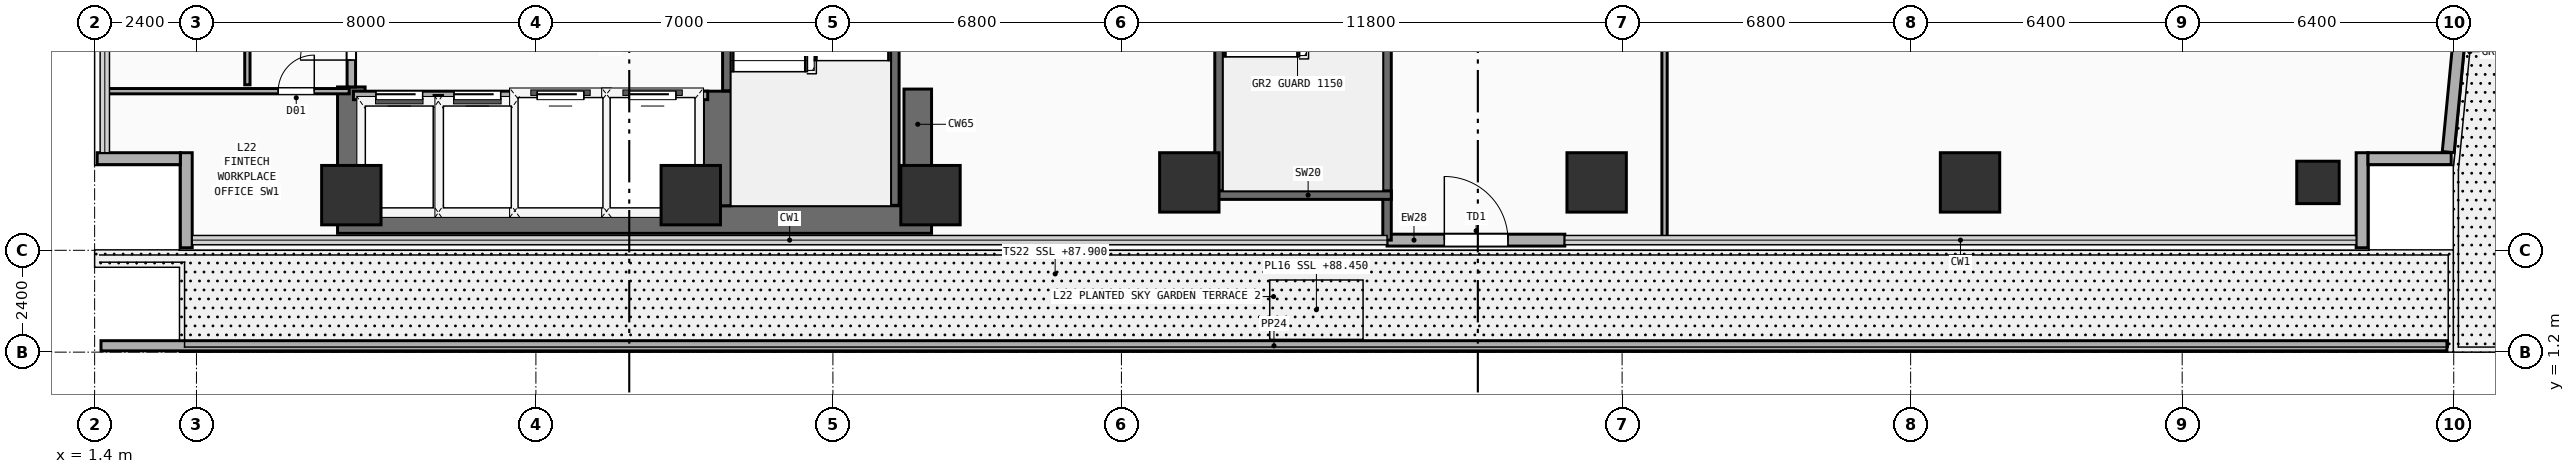
"""IFC4 building model, lengths in metres.
Left out: names, types, materials, properties, quantities, classifications, styles, units other than length and angle.
Written with IfcOpenShell. Run it as: python <this file> out.ifc"""

import sys

from ifc_helpers import new_model, si_unit, direction, frame, frame_2d, origin, origin_2d, place, context, subcontext, project, spatial, rectangle, extrude, element, fill, save


model = new_model("IFC4")
c1 = context("Model", 3, precision=1e-05, world=origin(), true_north=direction((0.0, 1.0)))
c2 = subcontext(c1, "Body", "Model", "MODEL_VIEW")
j1 = project(units=[si_unit("LENGTHUNIT", "METRE"), si_unit("PLANEANGLEUNIT", "RADIAN")], contexts=[c1])
p1 = place(None, origin())
s1 = spatial("IfcSite", under=j1, at=p1, CompositionType="ELEMENT")
p2 = place(p1, origin())
s2 = spatial("IfcBuilding", under=s1, at=p2, CompositionType="ELEMENT")
p3 = place(p2, frame((0.0, 0.0, 87.9)))
s3 = spatial("IfcBuildingStorey", under=s2, at=p3, CompositionType="ELEMENT", Elevation=87.9)
p4 = place(p3, frame((7.125, 4.325, 0.0), z_axis=(0.0, 0.0, 1.0), x_axis=(1.0, 0.0, 0.0)))
e1 = element("IfcWall", 1, at=p4, inside=s3, PredefinedType="SHEAR", context=c2, shape_type="SweptSolid", body=[
    extrude(rectangle(XDim=14.0, YDim=0.65, at=frame_2d((7.0, 0.0))), origin(), (0.0, 0.0, 1.0), 3.54),
])
p5 = place(p3, frame((7.45, 4.65, 0.0), z_axis=(0.0, 0.0, 1.0), x_axis=(0.0, 1.0, 0.0)))
e2 = element("IfcWall", 2, at=p5, inside=s3, PredefinedType="SHEAR", context=c2, shape_type="SweptSolid", body=[
    extrude(rectangle(XDim=2.8, YDim=0.65, at=frame_2d((1.4, 0.0))), origin(), (0.0, 0.0, 1.0), 3.54),
])
p6 = place(p3, frame((20.8, 4.65, 0.0), z_axis=(0.0, 0.0, 1.0), x_axis=(0.0, 1.0, 0.0)))
e3 = element("IfcWall", 3, at=p6, inside=s3, PredefinedType="SHEAR", context=c2, shape_type="SweptSolid", body=[
    extrude(rectangle(XDim=2.75, YDim=0.65, at=frame_2d((1.375, 0.0))), origin(), (0.0, 0.0, 1.0), 3.54),
])
p7 = place(p3, frame((16.075, 4.65, 0.0), z_axis=(0.0, 0.0, 1.0), x_axis=(0.0, 1.0, 0.0)))
e4 = element("IfcWall", 4, at=p7, inside=s3, PredefinedType="SHEAR", context=c2, shape_type="SweptSolid", body=[
    extrude(rectangle(XDim=2.7, YDim=0.65, at=frame_2d((1.35, 0.0))), origin(), (0.0, 0.0, 1.0), 3.54),
])
for number, where, z_axis, x_axis in (
    (5, (7.45, 4.9, 0.0), (0.0, 0.0, 1.0), (1.0, 0.0, 0.0)),
    (6, (15.45, 4.9, 0.0), (0.0, 0.0, 1.0), (1.0, 0.0, 0.0)),
    (7, (21.1, 4.9, 0.0), (0.0, 0.0, 1.0), (1.0, 0.0, 0.0)),
    (8, (27.2, 5.2, 0.0), (0.0, 0.0, 1.0), (1.0, 0.0, 0.0)),
    (9, (36.8, 5.2, 0.0), (0.0, 0.0, 1.0), (1.0, 0.0, 0.0)),
    (10, (45.6, 5.2, 0.0), (0.0, 0.0, 1.0), (1.0, 0.0, 0.0)),
):
    element("IfcColumn", number, at=place(p3, frame(where, z_axis=z_axis, x_axis=x_axis)), inside=s3, PredefinedType="COLUMN", context=c2, shape_type="SweptSolid", body=[
        extrude(rectangle(XDim=1.4, YDim=1.4, at=origin_2d()), origin(), (0.0, 0.0, 1.0), 3.54),
    ])
p8 = place(p3, frame((53.8, 5.2, 0.0), z_axis=(0.0, 0.0, 1.0), x_axis=(1.0, 0.0, 0.0)))
e11 = element("IfcColumn", 11, at=p8, inside=s3, PredefinedType="COLUMN", context=c2, shape_type="SweptSolid", body=[
    extrude(rectangle(XDim=1.0, YDim=1.0, at=origin_2d()), origin(), (0.0, 0.0, 1.0), 3.54),
])
p9 = place(p3, frame((31.86, 3.84, 0.0), z_axis=(0.0, 0.0, 1.0), x_axis=(1.0, 0.0, 0.0)))
e12 = element("IfcWall", 12, at=p9, inside=s3, PredefinedType="SOLIDWALL", context=c2, shape_type="SweptSolid", body=[
    extrude(rectangle(XDim=4.19, YDim=0.28, at=frame_2d((2.095, 0.0))), origin(), (0.0, 0.0, 1.0), 3.54),
])
p10 = place(p9, frame((1.35, 0.0, 0.0)))
e13 = element("IfcOpeningElement", 13, at=p10, cuts=e12, PredefinedType="OPENING", context=c2, shape_type="SweptSolid", body=[
    extrude(rectangle(XDim=1.5, YDim=2.25, at=frame_2d((0.75, 1.125))), frame((0.0, 0.15, 0.0), z_axis=(0.0, -1.0, 0.0), x_axis=(1.0, 0.0, 0.0)), (0.0, 0.0, 1.0), 0.3),
])
p11 = place(p3, frame((1.55, 1.35, 0.0), z_axis=(0.0, 0.0, 1.0), x_axis=(1.0, 0.0, 0.0)))
e14 = element("IfcWall", 14, at=p11, inside=s3, PredefinedType="PARAPET", context=c2, shape_type="SweptSolid", body=[
    extrude(rectangle(XDim=55.29, YDim=0.24, at=frame_2d((27.645, 0.0))), origin(), (0.0, 0.0, 1.0), 0.42),
])
p12 = place(p3, frame((3.56, 3.66, 0.0), z_axis=(0.0, 0.0, 1.0), x_axis=(0.0, 1.0, 0.0)))
e15 = element("IfcWall", 15, at=p12, inside=s3, PredefinedType="SOLIDWALL", context=c2, shape_type="SweptSolid", body=[
    extrude(rectangle(XDim=2.24, YDim=0.28, at=frame_2d((1.12, 0.0))), origin(), (0.0, 0.0, 1.0), 3.54),
])
p13 = place(p3, frame((1.46, 5.76, 0.0), z_axis=(0.0, 0.0, 1.0), x_axis=(1.0, 0.0, 0.0)))
e16 = element("IfcWall", 16, at=p13, inside=s3, PredefinedType="SOLIDWALL", context=c2, shape_type="SweptSolid", body=[
    extrude(rectangle(XDim=1.96, YDim=0.28, at=frame_2d((0.98, 0.0))), origin(), (0.0, 0.0, 1.0), 3.54),
])
p14 = place(p3, frame((54.84, 3.66, 0.0), z_axis=(0.0, 0.0, 1.0), x_axis=(0.0, 1.0, 0.0)))
e17 = element("IfcWall", 17, at=p14, inside=s3, PredefinedType="SOLIDWALL", context=c2, shape_type="SweptSolid", body=[
    extrude(rectangle(XDim=2.24, YDim=0.28, at=frame_2d((1.12, 0.0))), origin(), (0.0, 0.0, 1.0), 3.54),
])
p15 = place(p3, frame((54.98, 5.76, 0.0), z_axis=(0.0, 0.0, 1.0), x_axis=(1.0, 0.0, 0.0)))
e18 = element("IfcWall", 18, at=p15, inside=s3, PredefinedType="SOLIDWALL", context=c2, shape_type="SweptSolid", body=[
    extrude(rectangle(XDim=1.96, YDim=0.28, at=frame_2d((0.98, 0.0))), origin(), (0.0, 0.0, 1.0), 3.54),
])
p16 = place(p3, frame((56.869, 5.914, 0.0), z_axis=(0.0, 0.0, 1.0), x_axis=(0.095962807789, 0.99538492028, 0.0)))
e19 = element("IfcWall", 19, at=p16, inside=s3, PredefinedType="SOLIDWALL", context=c2, shape_type="SweptSolid", body=[
    extrude(rectangle(XDim=3.994, YDim=0.28, at=frame_2d((1.997, 0.0))), origin(), (0.0, 0.0, 1.0), 3.54),
])
p17 = place(p3, frame((16.3, 7.36, 0.0), z_axis=(0.0, 0.0, 1.0), x_axis=(0.0, 1.0, 0.0)))
e20 = element("IfcWall", 20, at=p17, inside=s3, PredefinedType="SHEAR", context=c2, shape_type="SweptSolid", body=[
    extrude(rectangle(XDim=2.58, YDim=0.2, at=frame_2d((1.29, 0.0))), origin(), (0.0, 0.0, 1.0), 3.54),
])
p18 = place(p3, frame((20.26, 4.66, 0.0), z_axis=(0.0, 0.0, 1.0), x_axis=(0.0, 1.0, 0.0)))
e21 = element("IfcWall", 21, at=p18, inside=s3, PredefinedType="SHEAR", context=c2, shape_type="SweptSolid", body=[
    extrude(rectangle(XDim=8.09, YDim=0.2, at=frame_2d((4.045, 0.0))), origin(), (0.0, 0.0, 1.0), 3.54),
])
p19 = place(p3, frame((27.9, 5.0, 0.0), z_axis=(0.0, 0.0, 1.0), x_axis=(0.0, 1.0, 0.0)))
e22 = element("IfcWall", 22, at=p19, inside=s3, PredefinedType="SHEAR", context=c2, shape_type="SweptSolid", body=[
    extrude(rectangle(XDim=8.1, YDim=0.2, at=frame_2d((4.05, 0.0))), origin(), (0.0, 0.0, 1.0), 3.54),
])
p20 = place(p3, frame((31.86, 3.84, 0.0), z_axis=(0.0, 0.0, 1.0), x_axis=(0.0, 1.0, 0.0)))
e23 = element("IfcWall", 23, at=p20, inside=s3, PredefinedType="SHEAR", context=c2, shape_type="SweptSolid", body=[
    extrude(rectangle(XDim=11.41, YDim=0.2, at=frame_2d((5.705, 0.0))), origin(), (0.0, 0.0, 1.0), 3.54),
])
p21 = place(p3, frame((27.8, 4.9, 0.0), z_axis=(0.0, 0.0, 1.0), x_axis=(1.0, 0.0, 0.0)))
e24 = element("IfcWall", 24, at=p21, inside=s3, PredefinedType="SHEAR", context=c2, shape_type="SweptSolid", body=[
    extrude(rectangle(XDim=4.16, YDim=0.2, at=frame_2d((2.08, 0.0))), origin(), (0.0, 0.0, 1.0), 3.54),
])
p22 = place(p3, frame((7.5, 7.25, 0.0), z_axis=(0.0, 0.0, 1.0), x_axis=(1.0, 0.0, 0.0)))
e25 = element("IfcWall", 25, at=p22, inside=s3, PredefinedType="PARTITIONING", context=c2, shape_type="SweptSolid", body=[
    extrude(rectangle(XDim=8.35, YDim=0.2, at=frame_2d((4.175, 0.0))), origin(), (0.0, 0.0, 1.0), 3.54),
])
p23 = place(p22, frame((0.53, 0.0, 0.0)))
e26 = element("IfcOpeningElement", 26, at=p23, cuts=e25, PredefinedType="OPENING", context=c2, shape_type="SweptSolid", body=[
    extrude(rectangle(XDim=1.1, YDim=2.2, at=frame_2d((0.55, 1.1))), frame((0.0, 0.11, 0.0), z_axis=(0.0, -1.0, 0.0), x_axis=(1.0, 0.0, 0.0)), (0.0, 0.0, 1.0), 0.22),
])
p24 = place(p22, frame((2.37, 0.0, 0.0)))
e27 = element("IfcOpeningElement", 27, at=p24, cuts=e25, PredefinedType="OPENING", context=c2, shape_type="SweptSolid", body=[
    extrude(rectangle(XDim=1.1, YDim=2.2, at=frame_2d((0.55, 1.1))), frame((0.0, 0.11, 0.0), z_axis=(0.0, -1.0, 0.0), x_axis=(1.0, 0.0, 0.0)), (0.0, 0.0, 1.0), 0.22),
])
p25 = place(p22, frame((4.33, 0.0, 0.0)))
e28 = element("IfcOpeningElement", 28, at=p25, cuts=e25, PredefinedType="OPENING", context=c2, shape_type="SweptSolid", body=[
    extrude(rectangle(XDim=1.1, YDim=2.2, at=frame_2d((0.55, 1.1))), frame((0.0, 0.11, 0.0), z_axis=(0.0, -1.0, 0.0), x_axis=(1.0, 0.0, 0.0)), (0.0, 0.0, 1.0), 0.22),
])
p26 = place(p22, frame((6.5, 0.0, 0.0)))
e29 = element("IfcOpeningElement", 29, at=p26, cuts=e25, PredefinedType="OPENING", context=c2, shape_type="SweptSolid", body=[
    extrude(rectangle(XDim=1.1, YDim=2.2, at=frame_2d((0.55, 1.1))), frame((0.0, 0.11, 0.0), z_axis=(0.0, -1.0, 0.0), x_axis=(1.0, 0.0, 0.0)), (0.0, 0.0, 1.0), 0.22),
])
for number, where, z_axis, x_axis in (
    (30, (9.5, 4.45, 0.0), (0.0, 0.0, 1.0), (0.0, 1.0, 0.0)),
    (31, (11.36, 4.45, 0.0), (0.0, 0.0, 1.0), (0.0, 1.0, 0.0)),
    (32, (13.46, 4.45, 0.0), (0.0, 0.0, 1.0), (0.0, 1.0, 0.0)),
):
    element("IfcWall", number, at=place(p3, frame(where, z_axis=z_axis, x_axis=x_axis)), inside=s3, PredefinedType="PARTITIONING", context=c2, shape_type="SweptSolid", body=[
        extrude(rectangle(XDim=2.8, YDim=0.2, at=frame_2d((1.4, 0.0))), origin(), (0.0, 0.0, 1.0), 3.54),
    ])
p27 = place(p3, frame((7.45, 7.45, 0.0), z_axis=(0.0, 0.0, 1.0), x_axis=(0.0, 1.0, 0.0)))
e33 = element("IfcWall", 33, at=p27, inside=s3, PredefinedType="PARTITIONING", context=c2, shape_type="SweptSolid", body=[
    extrude(rectangle(XDim=2.3, YDim=0.2, at=frame_2d((1.15, 0.0))), origin(), (0.0, 0.0, 1.0), 2.52),
])
p28 = place(p27, frame((0.633, 0.0, 0.0)))
e34 = element("IfcOpeningElement", 34, at=p28, cuts=e33, PredefinedType="OPENING", context=c2, shape_type="SweptSolid", body=[
    extrude(rectangle(XDim=1.2, YDim=2.25, at=frame_2d((0.6, 1.125))), frame((0.0, 0.11, 0.0), z_axis=(0.0, -1.0, 0.0), x_axis=(1.0, 0.0, 0.0)), (0.0, 0.0, 1.0), 0.22),
])
p29 = place(p3, frame((1.64, 7.35, 0.0), z_axis=(0.0, 0.0, 1.0), x_axis=(1.0, 0.0, 0.0)))
e35 = element("IfcWall", 35, at=p29, inside=s3, PredefinedType="PARTITIONING", context=c2, shape_type="SweptSolid", body=[
    extrude(rectangle(XDim=5.76, YDim=0.125, at=frame_2d((2.88, 0.0))), origin(), (0.0, 0.0, 1.0), 3.54),
])
p30 = place(p29, frame((4.087, 0.0, 0.0)))
e36 = element("IfcOpeningElement", 36, at=p30, cuts=e35, PredefinedType="OPENING", context=c2, shape_type="SweptSolid", body=[
    extrude(rectangle(XDim=0.85, YDim=2.15, at=frame_2d((0.425, 1.075))), frame((0.0, 0.073, 0.0), z_axis=(0.0, -1.0, 0.0), x_axis=(1.0, 0.0, 0.0)), (0.0, 0.0, 1.0), 0.145),
])
p31 = place(p3, frame((5.0, 7.5, 0.0), z_axis=(0.0, 0.0, 1.0), x_axis=(0.0, 1.0, 0.0)))
e37 = element("IfcWall", 37, at=p31, inside=s3, PredefinedType="PARTITIONING", context=c2, shape_type="SweptSolid", body=[
    extrude(rectangle(XDim=17.75, YDim=0.125, at=frame_2d((8.875, 0.0))), origin(), (0.0, 0.0, 1.0), 3.54),
])
p32 = place(p31, frame((2.85, 0.0, 0.0)))
e38 = element("IfcOpeningElement", 38, at=p32, cuts=e37, PredefinedType="OPENING", context=c2, shape_type="SweptSolid", body=[
    extrude(rectangle(XDim=0.95, YDim=2.15, at=frame_2d((0.475, 1.075))), frame((0.0, 0.073, 0.0), z_axis=(0.0, -1.0, 0.0), x_axis=(1.0, 0.0, 0.0)), (0.0, 0.0, 1.0), 0.145),
])
p33 = place(p31, frame((11.821, 0.0, 0.0)))
e39 = element("IfcOpeningElement", 39, at=p33, cuts=e37, PredefinedType="OPENING", context=c2, shape_type="SweptSolid", body=[
    extrude(rectangle(XDim=0.95, YDim=2.15, at=frame_2d((0.475, 1.075))), frame((0.0, 0.073, 0.0), z_axis=(0.0, -1.0, 0.0), x_axis=(1.0, 0.0, 0.0)), (0.0, 0.0, 1.0), 0.145),
])
p34 = place(p3, frame((38.4, 3.84, 0.0), z_axis=(0.0, 0.0, 1.0), x_axis=(0.0, 1.0, 0.0)))
e40 = element("IfcWall", 40, at=p34, inside=s3, PredefinedType="PARTITIONING", context=c2, shape_type="SweptSolid", body=[
    extrude(rectangle(XDim=20.12, YDim=0.125, at=frame_2d((10.06, 0.0))), origin(), (0.0, 0.0, 1.0), 3.54),
])
p35 = place(p34, frame((11.81, 0.0, 0.0)))
e41 = element("IfcOpeningElement", 41, at=p35, cuts=e40, PredefinedType="OPENING", context=c2, shape_type="SweptSolid", body=[
    extrude(rectangle(XDim=1.0, YDim=2.2, at=frame_2d((0.5, 1.1))), frame((0.0, 0.073, 0.0), z_axis=(0.0, -1.0, 0.0), x_axis=(1.0, 0.0, 0.0)), (0.0, 0.0, 1.0), 0.145),
])
p36 = place(p10, frame((1.5, 0.0, 0.0), z_axis=(0.0, 0.0, 1.0), x_axis=(-1.0, 0.0, 0.0)))
e42 = element("IfcDoor", 42, at=p36, inside=s3, OperationType="SINGLE_SWING_RIGHT", PredefinedType="DOOR", context=c2, shape_type="SweptSolid", body=[
    extrude(rectangle(XDim=1.5, YDim=2.25, at=frame_2d((0.75, 1.125))), frame((0.0, 0.025, 0.0), z_axis=(0.0, -1.0, 0.0), x_axis=(1.0, 0.0, 0.0)), (0.0, 0.0, 1.0), 0.05),
])
fill(e13, e42)
p37 = place(p23, origin())
e43 = element("IfcDoor", 43, at=p37, inside=s3, OperationType="SLIDING_TO_LEFT", PredefinedType="DOOR", context=c2, shape_type="SweptSolid", body=[
    extrude(rectangle(XDim=1.1, YDim=2.2, at=frame_2d((0.55, 1.1))), frame((0.0, 0.025, 0.0), z_axis=(0.0, -1.0, 0.0), x_axis=(1.0, 0.0, 0.0)), (0.0, 0.0, 1.0), 0.05),
])
fill(e26, e43)
p38 = place(p24, origin())
e44 = element("IfcDoor", 44, at=p38, inside=s3, OperationType="SLIDING_TO_LEFT", PredefinedType="DOOR", context=c2, shape_type="SweptSolid", body=[
    extrude(rectangle(XDim=1.1, YDim=2.2, at=frame_2d((0.55, 1.1))), frame((0.0, 0.025, 0.0), z_axis=(0.0, -1.0, 0.0), x_axis=(1.0, 0.0, 0.0)), (0.0, 0.0, 1.0), 0.05),
])
fill(e27, e44)
p39 = place(p25, origin())
e45 = element("IfcDoor", 45, at=p39, inside=s3, OperationType="SLIDING_TO_LEFT", PredefinedType="DOOR", context=c2, shape_type="SweptSolid", body=[
    extrude(rectangle(XDim=1.1, YDim=2.2, at=frame_2d((0.55, 1.1))), frame((0.0, 0.025, 0.0), z_axis=(0.0, -1.0, 0.0), x_axis=(1.0, 0.0, 0.0)), (0.0, 0.0, 1.0), 0.05),
])
fill(e28, e45)
p40 = place(p26, origin())
e46 = element("IfcDoor", 46, at=p40, inside=s3, OperationType="SLIDING_TO_LEFT", PredefinedType="DOOR", context=c2, shape_type="SweptSolid", body=[
    extrude(rectangle(XDim=1.1, YDim=2.2, at=frame_2d((0.55, 1.1))), frame((0.0, 0.025, 0.0), z_axis=(0.0, -1.0, 0.0), x_axis=(1.0, 0.0, 0.0)), (0.0, 0.0, 1.0), 0.05),
])
fill(e29, e46)
p41 = place(p28, frame((1.2, 0.0, 0.0), z_axis=(0.0, 0.0, 1.0), x_axis=(-1.0, 0.0, 0.0)))
e47 = element("IfcDoor", 47, at=p41, inside=s3, OperationType="SINGLE_SWING_RIGHT", PredefinedType="DOOR", context=c2, shape_type="SweptSolid", body=[
    extrude(rectangle(XDim=1.2, YDim=2.25, at=frame_2d((0.6, 1.125))), frame((0.0, 0.025, 0.0), z_axis=(0.0, -1.0, 0.0), x_axis=(1.0, 0.0, 0.0)), (0.0, 0.0, 1.0), 0.05),
])
fill(e34, e47)
p42 = place(p30, origin())
e48 = element("IfcDoor", 48, at=p42, inside=s3, OperationType="SINGLE_SWING_RIGHT", PredefinedType="DOOR", context=c2, shape_type="SweptSolid", body=[
    extrude(rectangle(XDim=0.85, YDim=2.15, at=frame_2d((0.425, 1.075))), frame((0.0, 0.025, 0.0), z_axis=(0.0, -1.0, 0.0), x_axis=(1.0, 0.0, 0.0)), (0.0, 0.0, 1.0), 0.05),
])
fill(e36, e48)
save(model, sys.argv[1])
